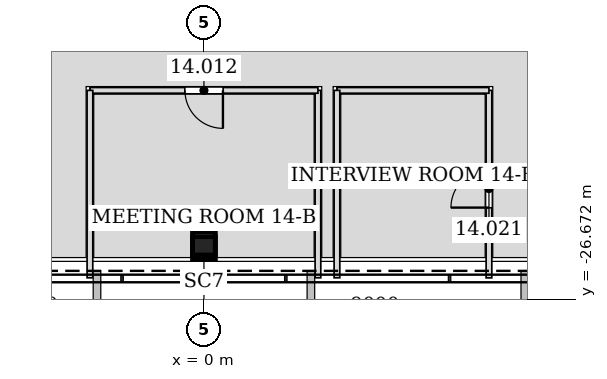
"""IFC4 building model, lengths in metres.
Left out: names, types, materials, properties, quantities, classifications, styles, units other than length and angle.
Written with IfcOpenShell. Run it as: python <this file> out.ifc"""

import sys

from ifc_helpers import new_model, si_unit, direction, frame, frame_2d, origin, origin_2d, place, context, subcontext, project, spatial, rectangle, hollow_rectangle, extrude, element, fill, save


model = new_model("IFC4")
c1 = context("Model", 3, precision=1e-05, world=origin(), true_north=direction((0.0, 1.0)))
c2 = subcontext(c1, "Body", "Model", "MODEL_VIEW")
j1 = project(units=[si_unit("LENGTHUNIT", "METRE"), si_unit("PLANEANGLEUNIT", "RADIAN")], contexts=[c1])
p1 = place(None, origin())
s1 = spatial("IfcSite", under=j1, at=p1, CompositionType="ELEMENT")
p2 = place(p1, origin())
s2 = spatial("IfcBuilding", under=s1, at=p2, CompositionType="ELEMENT")
p3 = place(p2, frame((0.0, 0.0, 66.6)))
s3 = spatial("IfcBuildingStorey", under=s2, at=p3, CompositionType="ELEMENT", Elevation=66.6)
p4 = place(p3, frame((0.0, -25.331, 0.0), z_axis=(0.0, 0.028297679255, 0.99959954049), x_axis=(-1.0, 0.0, 0.0)))
e1 = element("IfcColumn", 1, at=p4, inside=s3, PredefinedType="COLUMN", context=c2, shape_type="SweptSolid", body=[
    extrude(hollow_rectangle(XDim=0.6, YDim=0.6, WallThickness=0.032, at=origin_2d()), origin(), (0.0, 0.0, 1.0), 4.202),
])
p5 = place(p3, frame((3.0, -26.113, 0.0), z_axis=(0.0, 0.0, 1.0), x_axis=(0.0, 1.0, 0.0)))
e2 = element("IfcWall", 2, at=p5, inside=s3, PredefinedType="PARTITIONING", context=c2, shape_type="SweptSolid", body=[
    extrude(rectangle(XDim=4.932, YDim=0.15, at=frame_2d((2.466, 0.0))), origin(), (0.0, 0.0, 1.0), 3.423),
])
p6 = place(p3, frame((3.0, -21.181, 0.0), z_axis=(0.0, 0.0, 1.0), x_axis=(-1.0, 0.0, 0.0)))
e3 = element("IfcWall", 3, at=p6, inside=s3, PredefinedType="PARTITIONING", context=c2, shape_type="SweptSolid", body=[
    extrude(rectangle(XDim=6.0, YDim=0.15, at=frame_2d((3.0, 0.0))), origin(), (0.0, 0.0, 1.0), 3.065),
])
p7 = place(p6, frame((2.5, 0.0, 0.0)))
e4 = element("IfcOpeningElement", 4, at=p7, cuts=e3, PredefinedType="OPENING", context=c2, shape_type="SweptSolid", body=[
    extrude(rectangle(XDim=1.0, YDim=2.1, at=frame_2d((0.5, 1.05))), frame((0.0, 0.085, 0.0), z_axis=(0.0, -1.0, 0.0), x_axis=(1.0, 0.0, 0.0)), (0.0, 0.0, 1.0), 0.17),
])
p8 = place(p3, frame((-3.0, -21.181, 0.0), z_axis=(0.0, 0.0, 1.0), x_axis=(0.0, -1.0, 0.0)))
e5 = element("IfcWall", 5, at=p8, inside=s3, PredefinedType="PARTITIONING", context=c2, shape_type="SweptSolid", body=[
    extrude(rectangle(XDim=4.932, YDim=0.15, at=frame_2d((2.466, 0.0))), origin(), (0.0, 0.0, 1.0), 3.423),
])
p9 = place(p3, frame((7.5, -26.115, 0.0), z_axis=(0.0, 0.0, 1.0), x_axis=(0.0, 1.0, 0.0)))
e6 = element("IfcWall", 6, at=p9, inside=s3, PredefinedType="PARTITIONING", context=c2, shape_type="SweptSolid", body=[
    extrude(rectangle(XDim=4.934, YDim=0.15, at=frame_2d((2.467, 0.0))), origin(), (0.0, 0.0, 1.0), 3.423),
])
p10 = place(p9, frame((1.849, 0.0, 0.0)))
e7 = element("IfcOpeningElement", 7, at=p10, cuts=e6, PredefinedType="OPENING", context=c2, shape_type="SweptSolid", body=[
    extrude(rectangle(XDim=1.0, YDim=2.1, at=frame_2d((0.5, 1.05))), frame((0.0, 0.085, 0.0), z_axis=(0.0, -1.0, 0.0), x_axis=(1.0, 0.0, 0.0)), (0.0, 0.0, 1.0), 0.17),
])
p11 = place(p3, frame((7.5, -21.181, 0.0), z_axis=(0.0, 0.0, 1.0), x_axis=(-1.0, 0.0, 0.0)))
e8 = element("IfcWall", 8, at=p11, inside=s3, PredefinedType="PARTITIONING", context=c2, shape_type="SweptSolid", body=[
    extrude(rectangle(XDim=4.0, YDim=0.15, at=frame_2d((2.0, 0.0))), origin(), (0.0, 0.0, 1.0), 4.035),
])
p12 = place(p3, frame((3.5, -21.181, 0.0), z_axis=(0.0, 0.0, 1.0), x_axis=(0.0, -1.0, 0.0)))
e9 = element("IfcWall", 9, at=p12, inside=s3, PredefinedType="PARTITIONING", context=c2, shape_type="SweptSolid", body=[
    extrude(rectangle(XDim=4.932, YDim=0.15, at=frame_2d((2.466, 0.0))), origin(), (0.0, 0.0, 1.0), 3.423),
])
p13 = place(p7, origin())
e10 = element("IfcDoor", 10, at=p13, inside=s3, OperationType="SINGLE_SWING_LEFT", PredefinedType="DOOR", context=c2, shape_type="SweptSolid", body=[
    extrude(rectangle(XDim=1.0, YDim=2.1, at=frame_2d((0.5, 1.05))), frame((0.0, 0.025, 0.0), z_axis=(0.0, -1.0, 0.0), x_axis=(1.0, 0.0, 0.0)), (0.0, 0.0, 1.0), 0.05),
])
fill(e4, e10)
p14 = place(p10, origin())
e11 = element("IfcDoor", 11, at=p14, inside=s3, OperationType="SINGLE_SWING_LEFT", PredefinedType="DOOR", context=c2, shape_type="SweptSolid", body=[
    extrude(rectangle(XDim=1.0, YDim=2.1, at=frame_2d((0.5, 1.05))), frame((0.0, 0.025, 0.0), z_axis=(0.0, -1.0, 0.0), x_axis=(1.0, 0.0, 0.0)), (0.0, 0.0, 1.0), 0.05),
])
fill(e7, e11)
save(model, sys.argv[1])
